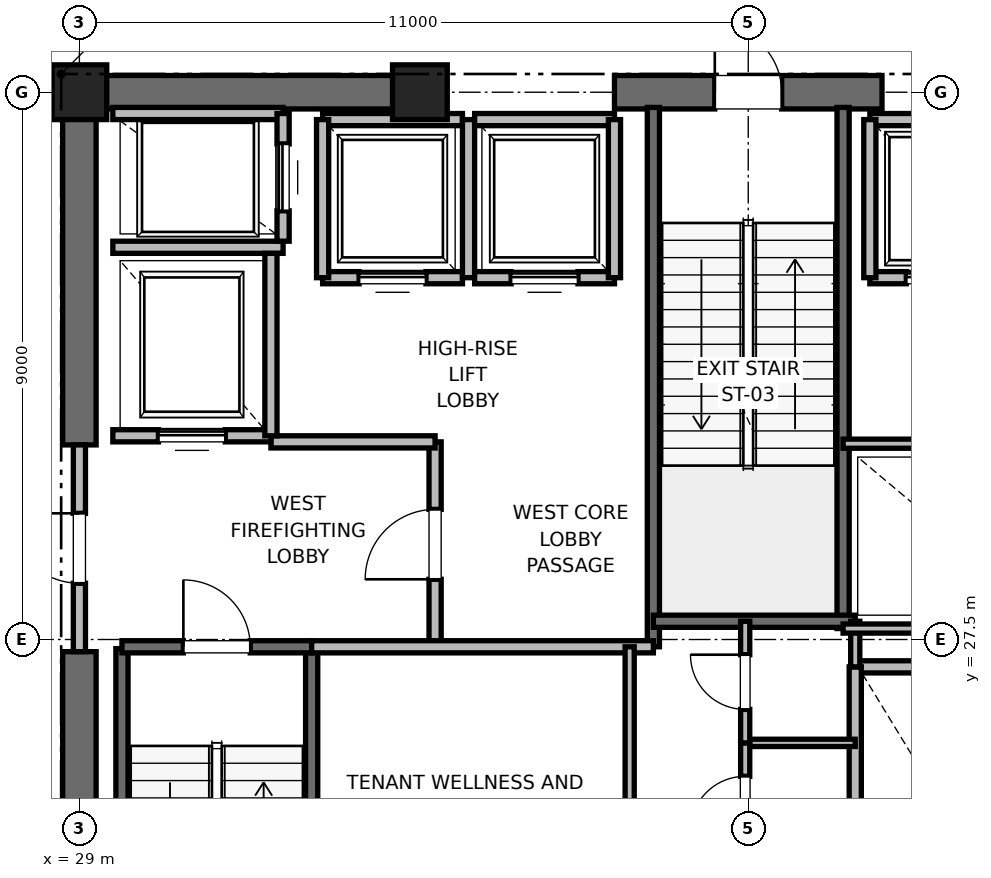
"""IFC4 building model, lengths in metres.
Left out: names, types, materials, properties, quantities, classifications, styles, units other than length and angle.
Written with IfcOpenShell. Run it as: python <this file> out.ifc"""

import sys

from ifc_helpers import new_model, si_unit, direction, frame, frame_2d, origin, origin_2d, place, context, subcontext, project, spatial, rectangle, extrude, element, fill, save


model = new_model("IFC4")
c1 = context("Model", 3, precision=1e-05, world=origin(), true_north=direction((0.0, 1.0)))
c2 = subcontext(c1, "Body", "Model", "MODEL_VIEW")
j1 = project(units=[si_unit("LENGTHUNIT", "METRE"), si_unit("PLANEANGLEUNIT", "RADIAN")], contexts=[c1])
p1 = place(None, origin())
s1 = spatial("IfcSite", under=j1, at=p1, CompositionType="ELEMENT")
p2 = place(p1, origin())
s2 = spatial("IfcBuilding", under=s1, at=p2, CompositionType="ELEMENT")
p3 = place(p2, frame((0.0, 0.0, 238.2)))
s3 = spatial("IfcBuildingStorey", under=s2, at=p3, CompositionType="ELEMENT", Elevation=238.2)
for number, where, z_axis, x_axis in (
    (1, (29.0, 36.5, 0.0), (0.0, 0.0, 1.0), (1.0, 0.0, 0.0)),
    (2, (34.6, 36.5, 0.0), (0.0, 0.0, 1.0), (1.0, 0.0, 0.0)),
):
    element("IfcColumn", number, at=place(p3, frame(where, z_axis=z_axis, x_axis=x_axis)), inside=s3, PredefinedType="PILASTER", context=c2, shape_type="SweptSolid", body=[
        extrude(rectangle(XDim=0.9, YDim=0.9, at=origin_2d()), origin(), (0.0, 0.0, 1.0), 5.0),
    ])
p4 = place(p3, frame((29.0, 36.5, 0.0), z_axis=(0.0, 0.0, 1.0), x_axis=(1.0, 0.0, 0.0)))
e3 = element("IfcWall", 3, at=p4, inside=s3, PredefinedType="SHEAR", context=c2, shape_type="SweptSolid", body=[
    extrude(rectangle(XDim=5.8, YDim=0.55, at=frame_2d((2.9, 0.0))), origin(), (0.0, 0.0, 1.0), 4.785),
])
p5 = place(p3, frame((37.8, 36.5, 0.0), z_axis=(0.0, 0.0, 1.0), x_axis=(1.0, 0.0, 0.0)))
e4 = element("IfcWall", 4, at=p5, inside=s3, PredefinedType="SHEAR", context=c2, shape_type="SweptSolid", body=[
    extrude(rectangle(XDim=4.4, YDim=0.55, at=frame_2d((2.2, 0.0))), origin(), (0.0, 0.0, 1.0), 4.785),
])
p6 = place(p5, frame((1.65, 0.0, 0.0)))
e5 = element("IfcOpeningElement", 5, at=p6, cuts=e4, PredefinedType="OPENING", context=c2, shape_type="SweptSolid", body=[
    extrude(rectangle(XDim=1.1, YDim=2.15, at=frame_2d((0.55, 1.075))), frame((0.0, 0.275, 0.0), z_axis=(0.0, -1.0, 0.0), x_axis=(1.0, 0.0, 0.0)), (0.0, 0.0, 1.0), 0.55),
])
p7 = place(p3, frame((29.0, 18.5, 0.0), z_axis=(0.0, 0.0, 1.0), x_axis=(0.0, 1.0, 0.0)))
e6 = element("IfcWall", 6, at=p7, inside=s3, PredefinedType="SHEAR", context=c2, shape_type="SweptSolid", body=[
    extrude(rectangle(XDim=8.8, YDim=0.55, at=frame_2d((4.4, 0.0))), origin(), (0.0, 0.0, 1.0), 4.785),
])
p8 = place(p3, frame((29.0, 30.7, 0.0), z_axis=(0.0, 0.0, 1.0), x_axis=(0.0, 1.0, 0.0)))
e7 = element("IfcWall", 7, at=p8, inside=s3, PredefinedType="SHEAR", context=c2, shape_type="SweptSolid", body=[
    extrude(rectangle(XDim=5.8, YDim=0.55, at=frame_2d((2.9, 0.0))), origin(), (0.0, 0.0, 1.0), 4.785),
])
p9 = place(p3, frame((29.7, 19.2, 0.0), z_axis=(0.0, 0.0, 1.0), x_axis=(0.0, 1.0, 0.0)))
e8 = element("IfcWall", 8, at=p9, inside=s3, PredefinedType="SOLIDWALL", context=c2, shape_type="SweptSolid", body=[
    extrude(rectangle(XDim=8.15, YDim=0.2, at=frame_2d((4.075, 0.0))), origin(), (0.0, 0.0, 1.0), 4.785),
])
p10 = place(p3, frame((32.82, 18.6, 0.0), z_axis=(0.0, 0.0, 1.0), x_axis=(0.0, 1.0, 0.0)))
e9 = element("IfcWall", 9, at=p10, inside=s3, PredefinedType="SOLIDWALL", context=c2, shape_type="SweptSolid", body=[
    extrude(rectangle(XDim=8.78, YDim=0.2, at=frame_2d((4.39, 0.0))), origin(), (0.0, 0.0, 1.0), 4.785),
])
p11 = place(p3, frame((29.7, 27.38, 0.0), z_axis=(0.0, 0.0, 1.0), x_axis=(1.0, 0.0, 0.0)))
e10 = element("IfcWall", 10, at=p11, inside=s3, PredefinedType="SOLIDWALL", context=c2, shape_type="SweptSolid", body=[
    extrude(rectangle(XDim=3.12, YDim=0.2, at=frame_2d((1.56, 0.0))), origin(), (0.0, 0.0, 1.0), 4.785),
])
p12 = place(p11, frame((1.01, 0.0, 0.0)))
e11 = element("IfcOpeningElement", 11, at=p12, cuts=e10, PredefinedType="OPENING", context=c2, shape_type="SweptSolid", body=[
    extrude(rectangle(XDim=1.1, YDim=2.15, at=frame_2d((0.55, 1.075))), frame((0.0, 0.1, 0.0), z_axis=(0.0, -1.0, 0.0), x_axis=(1.0, 0.0, 0.0)), (0.0, 0.0, 1.0), 0.2),
])
p13 = place(p3, frame((38.44, 27.38, 0.0), z_axis=(0.0, 0.0, 1.0), x_axis=(0.0, 1.0, 0.0)))
e12 = element("IfcWall", 12, at=p13, inside=s3, PredefinedType="SOLIDWALL", context=c2, shape_type="SweptSolid", body=[
    extrude(rectangle(XDim=8.87, YDim=0.2, at=frame_2d((4.435, 0.0))), origin(), (0.0, 0.0, 1.0), 4.785),
])
p14 = place(p3, frame((41.56, 27.68, 0.0), z_axis=(0.0, 0.0, 1.0), x_axis=(0.0, 1.0, 0.0)))
e13 = element("IfcWall", 13, at=p14, inside=s3, PredefinedType="SOLIDWALL", context=c2, shape_type="SweptSolid", body=[
    extrude(rectangle(XDim=8.57, YDim=0.2, at=frame_2d((4.285, 0.0))), origin(), (0.0, 0.0, 1.0), 4.785),
])
p15 = place(p3, frame((38.44, 27.8, 0.0), z_axis=(0.0, 0.0, 1.0), x_axis=(1.0, 0.0, 0.0)))
e14 = element("IfcWall", 14, at=p15, inside=s3, PredefinedType="SOLIDWALL", context=c2, shape_type="SweptSolid", body=[
    extrude(rectangle(XDim=3.32, YDim=0.2, at=frame_2d((1.66, 0.0))), origin(), (0.0, 0.0, 1.0), 4.785),
])
p16 = place(p3, frame((34.85, 27.38, 0.0), z_axis=(0.0, 0.0, 1.0), x_axis=(0.0, 1.0, 0.0)))
e15 = element("IfcWall", 15, at=p16, inside=s3, PredefinedType="PARTITIONING", context=c2, shape_type="SweptSolid", body=[
    extrude(rectangle(XDim=3.37, YDim=0.2, at=frame_2d((1.685, 0.0))), origin(), (0.0, 0.0, 1.0), 4.785),
])
p17 = place(p16, frame((1.11, 0.0, 0.0)))
e16 = element("IfcOpeningElement", 16, at=p17, cuts=e15, PredefinedType="OPENING", context=c2, shape_type="SweptSolid", body=[
    extrude(rectangle(XDim=1.15, YDim=2.2, at=frame_2d((0.575, 1.1))), frame((0.0, 0.1, 0.0), z_axis=(0.0, -1.0, 0.0), x_axis=(1.0, 0.0, 0.0)), (0.0, 0.0, 1.0), 0.2),
])
p18 = place(p3, frame((29.0, 27.3, 0.0), z_axis=(0.0, 0.0, 1.0), x_axis=(0.0, 1.0, 0.0)))
e17 = element("IfcWall", 17, at=p18, inside=s3, PredefinedType="PARTITIONING", context=c2, shape_type="SweptSolid", body=[
    extrude(rectangle(XDim=3.4, YDim=0.2, at=frame_2d((1.7, 0.0))), origin(), (0.0, 0.0, 1.0), 3.765),
])
p19 = place(p18, frame((1.125, 0.0, 0.0)))
e18 = element("IfcOpeningElement", 18, at=p19, cuts=e17, PredefinedType="OPENING", context=c2, shape_type="SweptSolid", body=[
    extrude(rectangle(XDim=1.15, YDim=2.2, at=frame_2d((0.575, 1.1))), frame((0.0, 0.1, 0.0), z_axis=(0.0, -1.0, 0.0), x_axis=(1.0, 0.0, 0.0)), (0.0, 0.0, 1.0), 0.2),
])
p20 = place(p3, frame((32.82, 27.38, 0.0), z_axis=(0.0, 0.0, 1.0), x_axis=(1.0, 0.0, 0.0)))
e19 = element("IfcWall", 19, at=p20, inside=s3, PredefinedType="PARTITIONING", context=c2, shape_type="SweptSolid", body=[
    extrude(rectangle(XDim=5.62, YDim=0.2, at=frame_2d((2.81, 0.0))), origin(), (0.0, 0.0, 1.0), 4.785),
])
p21 = place(p3, frame((32.15, 30.75, 0.0), z_axis=(0.0, 0.0, 1.0), x_axis=(1.0, 0.0, 0.0)))
e20 = element("IfcWall", 20, at=p21, inside=s3, PredefinedType="PARTITIONING", context=c2, shape_type="SweptSolid", body=[
    extrude(rectangle(XDim=2.7, YDim=0.2, at=frame_2d((1.35, 0.0))), origin(), (0.0, 0.0, 1.0), 4.785),
])
p22 = place(p3, frame((29.55, 30.85, 0.0), z_axis=(0.0, 0.0, 1.0), x_axis=(1.0, 0.0, 0.0)))
e21 = element("IfcWall", 21, at=p22, inside=s3, PredefinedType="SOLIDWALL", context=c2, shape_type="SweptSolid", body=[
    extrude(rectangle(XDim=2.6, YDim=0.2, at=frame_2d((1.3, 0.0))), origin(), (0.0, 0.0, 1.0), 3.765),
])
p23 = place(p22, frame((0.75, 0.0, 0.0)))
e22 = element("IfcOpeningElement", 22, at=p23, cuts=e21, PredefinedType="OPENING", context=c2, shape_type="SweptSolid", body=[
    extrude(rectangle(XDim=1.1, YDim=2.2, at=frame_2d((0.55, 1.1))), frame((0.0, 0.1, 0.0), z_axis=(0.0, -1.0, 0.0), x_axis=(1.0, 0.0, 0.0)), (0.0, 0.0, 1.0), 0.2),
])
p24 = place(p3, frame((29.55, 33.95, 0.0), z_axis=(0.0, 0.0, 1.0), x_axis=(1.0, 0.0, 0.0)))
e23 = element("IfcWall", 23, at=p24, inside=s3, PredefinedType="SOLIDWALL", context=c2, shape_type="SweptSolid", body=[
    extrude(rectangle(XDim=2.8, YDim=0.2, at=frame_2d((1.4, 0.0))), origin(), (0.0, 0.0, 1.0), 4.785),
])
p25 = place(p3, frame((32.15, 30.85, 0.0), z_axis=(0.0, 0.0, 1.0), x_axis=(0.0, 1.0, 0.0)))
e24 = element("IfcWall", 24, at=p25, inside=s3, PredefinedType="SOLIDWALL", context=c2, shape_type="SweptSolid", body=[
    extrude(rectangle(XDim=3.0, YDim=0.2, at=frame_2d((1.5, 0.0))), origin(), (0.0, 0.0, 1.0), 4.785),
])
p26 = place(p3, frame((32.35, 36.15, 0.0), z_axis=(0.0, 0.0, 1.0), x_axis=(-1.0, 0.0, 0.0)))
e25 = element("IfcWall", 25, at=p26, inside=s3, PredefinedType="SOLIDWALL", context=c2, shape_type="SweptSolid", body=[
    extrude(rectangle(XDim=2.8, YDim=0.2, at=frame_2d((1.4, 0.0))), origin(), (0.0, 0.0, 1.0), 4.072),
])
p27 = place(p3, frame((32.35, 34.05, 0.0), z_axis=(0.0, 0.0, 1.0), x_axis=(0.0, 1.0, 0.0)))
e26 = element("IfcWall", 26, at=p27, inside=s3, PredefinedType="SOLIDWALL", context=c2, shape_type="SweptSolid", body=[
    extrude(rectangle(XDim=2.1, YDim=0.2, at=frame_2d((1.05, 0.0))), origin(), (0.0, 0.0, 1.0), 4.785),
])
p28 = place(p27, frame((0.5, 0.0, 0.0)))
e27 = element("IfcOpeningElement", 27, at=p28, cuts=e26, PredefinedType="OPENING", context=c2, shape_type="SweptSolid", body=[
    extrude(rectangle(XDim=1.1, YDim=2.2, at=frame_2d((0.55, 1.1))), frame((0.0, 0.1, 0.0), z_axis=(0.0, -1.0, 0.0), x_axis=(1.0, 0.0, 0.0)), (0.0, 0.0, 1.0), 0.2),
])
p29 = place(p3, frame((43.44, 27.05, 0.0), z_axis=(0.0, 0.0, 1.0), x_axis=(-1.0, 0.0, 0.0)))
e28 = element("IfcWall", 28, at=p29, inside=s3, PredefinedType="SOLIDWALL", context=c2, shape_type="SweptSolid", body=[
    extrude(rectangle(XDim=1.68, YDim=0.2, at=frame_2d((0.84, 0.0))), origin(), (0.0, 0.0, 1.0), 4.785),
])
p30 = place(p3, frame((41.76, 27.05, 0.0), z_axis=(0.0, 0.0, 1.0), x_axis=(0.0, -1.0, 0.0)))
e29 = element("IfcWall", 29, at=p30, inside=s3, PredefinedType="SOLIDWALL", context=c2, shape_type="SweptSolid", body=[
    extrude(rectangle(XDim=2.6, YDim=0.2, at=frame_2d((1.3, 0.0))), origin(), (0.0, 0.0, 1.0), 4.785),
])
p31 = place(p3, frame((33.0, 33.45, 0.0), z_axis=(0.0, 0.0, 1.0), x_axis=(1.0, 0.0, 0.0)))
e30 = element("IfcWall", 30, at=p31, inside=s3, PredefinedType="SOLIDWALL", context=c2, shape_type="SweptSolid", body=[
    extrude(rectangle(XDim=2.3, YDim=0.2, at=frame_2d((1.15, 0.0))), origin(), (0.0, 0.0, 1.0), 4.785),
])
p32 = place(p31, frame((0.6, 0.0, 0.0)))
e31 = element("IfcOpeningElement", 31, at=p32, cuts=e30, PredefinedType="OPENING", context=c2, shape_type="SweptSolid", body=[
    extrude(rectangle(XDim=1.1, YDim=2.2, at=frame_2d((0.55, 1.1))), frame((0.0, 0.1, 0.0), z_axis=(0.0, -1.0, 0.0), x_axis=(1.0, 0.0, 0.0)), (0.0, 0.0, 1.0), 0.2),
])
p33 = place(p3, frame((35.3, 36.05, 0.0), z_axis=(0.0, 0.0, 1.0), x_axis=(-1.0, 0.0, 0.0)))
e32 = element("IfcWall", 32, at=p33, inside=s3, PredefinedType="SOLIDWALL", context=c2, shape_type="SweptSolid", body=[
    extrude(rectangle(XDim=2.3, YDim=0.2, at=frame_2d((1.15, 0.0))), origin(), (0.0, 0.0, 1.0), 3.765),
])
p34 = place(p3, frame((33.0, 36.05, 0.0), z_axis=(0.0, 0.0, 1.0), x_axis=(0.0, -1.0, 0.0)))
e33 = element("IfcWall", 33, at=p34, inside=s3, PredefinedType="SOLIDWALL", context=c2, shape_type="SweptSolid", body=[
    extrude(rectangle(XDim=2.6, YDim=0.2, at=frame_2d((1.3, 0.0))), origin(), (0.0, 0.0, 1.0), 4.785),
])
p35 = place(p3, frame((35.4, 33.45, 0.0), z_axis=(0.0, 0.0, 1.0), x_axis=(0.0, 1.0, 0.0)))
e34 = element("IfcWall", 34, at=p35, inside=s3, PredefinedType="SOLIDWALL", context=c2, shape_type="SweptSolid", body=[
    extrude(rectangle(XDim=2.6, YDim=0.2, at=frame_2d((1.3, 0.0))), origin(), (0.0, 0.0, 1.0), 3.765),
])
p36 = place(p3, frame((35.5, 33.45, 0.0), z_axis=(0.0, 0.0, 1.0), x_axis=(1.0, 0.0, 0.0)))
e35 = element("IfcWall", 35, at=p36, inside=s3, PredefinedType="SOLIDWALL", context=c2, shape_type="SweptSolid", body=[
    extrude(rectangle(XDim=2.3, YDim=0.2, at=frame_2d((1.15, 0.0))), origin(), (0.0, 0.0, 1.0), 4.785),
])
p37 = place(p36, frame((0.6, 0.0, 0.0)))
e36 = element("IfcOpeningElement", 36, at=p37, cuts=e35, PredefinedType="OPENING", context=c2, shape_type="SweptSolid", body=[
    extrude(rectangle(XDim=1.1, YDim=2.2, at=frame_2d((0.55, 1.1))), frame((0.0, 0.1, 0.0), z_axis=(0.0, -1.0, 0.0), x_axis=(1.0, 0.0, 0.0)), (0.0, 0.0, 1.0), 0.2),
])
p38 = place(p3, frame((37.8, 36.05, 0.0), z_axis=(0.0, 0.0, 1.0), x_axis=(-1.0, 0.0, 0.0)))
e37 = element("IfcWall", 37, at=p38, inside=s3, PredefinedType="SOLIDWALL", context=c2, shape_type="SweptSolid", body=[
    extrude(rectangle(XDim=2.3, YDim=0.2, at=frame_2d((1.15, 0.0))), origin(), (0.0, 0.0, 1.0), 3.765),
])
p39 = place(p3, frame((37.8, 33.45, 0.0), z_axis=(0.0, 0.0, 1.0), x_axis=(0.0, 1.0, 0.0)))
e38 = element("IfcWall", 38, at=p39, inside=s3, PredefinedType="SOLIDWALL", context=c2, shape_type="SweptSolid", body=[
    extrude(rectangle(XDim=2.6, YDim=0.2, at=frame_2d((1.3, 0.0))), origin(), (0.0, 0.0, 1.0), 3.765),
])
p40 = place(p3, frame((42.0, 33.45, 0.0), z_axis=(0.0, 0.0, 1.0), x_axis=(1.0, 0.0, 0.0)))
e39 = element("IfcWall", 39, at=p40, inside=s3, PredefinedType="SOLIDWALL", context=c2, shape_type="SweptSolid", body=[
    extrude(rectangle(XDim=2.3, YDim=0.2, at=frame_2d((1.15, 0.0))), origin(), (0.0, 0.0, 1.0), 4.785),
])
p41 = place(p40, frame((0.6, 0.0, 0.0)))
e40 = element("IfcOpeningElement", 40, at=p41, cuts=e39, PredefinedType="OPENING", context=c2, shape_type="SweptSolid", body=[
    extrude(rectangle(XDim=1.1, YDim=2.2, at=frame_2d((0.55, 1.1))), frame((0.0, 0.1, 0.0), z_axis=(0.0, -1.0, 0.0), x_axis=(1.0, 0.0, 0.0)), (0.0, 0.0, 1.0), 0.2),
])
p42 = place(p3, frame((44.3, 36.05, 0.0), z_axis=(0.0, 0.0, 1.0), x_axis=(-1.0, 0.0, 0.0)))
e41 = element("IfcWall", 41, at=p42, inside=s3, PredefinedType="SOLIDWALL", context=c2, shape_type="SweptSolid", body=[
    extrude(rectangle(XDim=2.3, YDim=0.2, at=frame_2d((1.15, 0.0))), origin(), (0.0, 0.0, 1.0), 3.765),
])
p43 = place(p3, frame((42.0, 36.05, 0.0), z_axis=(0.0, 0.0, 1.0), x_axis=(0.0, -1.0, 0.0)))
e42 = element("IfcWall", 42, at=p43, inside=s3, PredefinedType="SOLIDWALL", context=c2, shape_type="SweptSolid", body=[
    extrude(rectangle(XDim=2.6, YDim=0.2, at=frame_2d((1.3, 0.0))), origin(), (0.0, 0.0, 1.0), 3.765),
])
p44 = place(p3, frame((39.95, 25.8, 0.0), z_axis=(0.0, 0.0, 1.0), x_axis=(1.0, 0.0, 0.0)))
e43 = element("IfcWall", 43, at=p44, inside=s3, PredefinedType="PARTITIONING", context=c2, shape_type="SweptSolid", body=[
    extrude(rectangle(XDim=1.81, YDim=0.12, at=frame_2d((0.905, 0.0))), origin(), (0.0, 0.0, 1.0), 2.85),
])
p45 = place(p3, frame((41.76, 27.05, 0.0), z_axis=(0.0, 0.0, 1.0), x_axis=(0.0, 1.0, 0.0)))
e44 = element("IfcWall", 44, at=p45, inside=s3, PredefinedType="PARTITIONING", context=c2, shape_type="SweptSolid", body=[
    extrude(rectangle(XDim=0.75, YDim=0.15, at=frame_2d((0.375, 0.0))), origin(), (0.0, 0.0, 1.0), 2.85),
])
p46 = place(p3, frame((39.95, 23.8, 0.0), z_axis=(0.0, 0.0, 1.0), x_axis=(0.0, 1.0, 0.0)))
e45 = element("IfcWall", 45, at=p46, inside=s3, PredefinedType="PARTITIONING", context=c2, shape_type="SweptSolid", body=[
    extrude(rectangle(XDim=2.0, YDim=0.15, at=frame_2d((1.0, 0.0))), origin(), (0.0, 0.0, 1.0), 2.85),
])
p47 = place(p46, frame((0.55, 0.0, 0.0)))
e46 = element("IfcOpeningElement", 46, at=p47, cuts=e45, PredefinedType="OPENING", context=c2, shape_type="SweptSolid", body=[
    extrude(rectangle(XDim=0.9, YDim=2.1, at=frame_2d((0.45, 1.05))), frame((0.0, 0.075, 0.0), z_axis=(0.0, -1.0, 0.0), x_axis=(1.0, 0.0, 0.0)), (0.0, 0.0, 1.0), 0.15),
])
p48 = place(p3, frame((39.95, 25.8, 0.0), z_axis=(0.0, 0.0, 1.0), x_axis=(0.0, 1.0, 0.0)))
e47 = element("IfcWall", 47, at=p48, inside=s3, PredefinedType="PARTITIONING", context=c2, shape_type="SweptSolid", body=[
    extrude(rectangle(XDim=2.0, YDim=0.15, at=frame_2d((1.0, 0.0))), origin(), (0.0, 0.0, 1.0), 2.85),
])
p49 = place(p48, frame((0.55, 0.0, 0.0)))
e48 = element("IfcOpeningElement", 48, at=p49, cuts=e47, PredefinedType="OPENING", context=c2, shape_type="SweptSolid", body=[
    extrude(rectangle(XDim=0.9, YDim=2.1, at=frame_2d((0.45, 1.05))), frame((0.0, 0.075, 0.0), z_axis=(0.0, -1.0, 0.0), x_axis=(1.0, 0.0, 0.0)), (0.0, 0.0, 1.0), 0.15),
])
p50 = place(p3, frame((38.05, 18.6, 0.0), z_axis=(0.0, 0.0, 1.0), x_axis=(0.0, 1.0, 0.0)))
e49 = element("IfcWall", 49, at=p50, inside=s3, PredefinedType="PARTITIONING", context=c2, shape_type="SweptSolid", body=[
    extrude(rectangle(XDim=8.78, YDim=0.15, at=frame_2d((4.39, 0.0))), origin(), (0.0, 0.0, 1.0), 2.85),
])
p51 = place(p50, frame((3.89, 0.0, 0.0)))
e50 = element("IfcOpeningElement", 50, at=p51, cuts=e49, PredefinedType="OPENING", context=c2, shape_type="SweptSolid", body=[
    extrude(rectangle(XDim=1.0, YDim=2.15, at=frame_2d((0.5, 1.075))), frame((0.0, 0.075, 0.0), z_axis=(0.0, -1.0, 0.0), x_axis=(1.0, 0.0, 0.0)), (0.0, 0.0, 1.0), 0.15),
])
p52 = place(p3, frame((41.56, 27.68, 0.0), z_axis=(0.0, 0.0, 1.0), x_axis=(1.0, 0.0, 0.0)))
e51 = element("IfcWall", 51, at=p52, inside=s3, PredefinedType="PARTITIONING", context=c2, shape_type="SweptSolid", body=[
    extrude(rectangle(XDim=3.59, YDim=0.15, at=frame_2d((1.795, 0.0))), origin(), (0.0, 0.0, 1.0), 2.85),
])
p53 = place(p3, frame((41.56, 30.72, 0.0), z_axis=(0.0, 0.0, 1.0), x_axis=(1.0, 0.0, 0.0)))
e52 = element("IfcWall", 52, at=p53, inside=s3, PredefinedType="PARTITIONING", context=c2, shape_type="SweptSolid", body=[
    extrude(rectangle(XDim=3.59, YDim=0.15, at=frame_2d((1.795, 0.0))), origin(), (0.0, 0.0, 1.0), 2.85),
])
p54 = place(p53, frame((1.355, 0.0, 0.0)))
e53 = element("IfcOpeningElement", 53, at=p54, cuts=e52, PredefinedType="OPENING", context=c2, shape_type="SweptSolid", body=[
    extrude(rectangle(XDim=0.88, YDim=2.1, at=frame_2d((0.44, 1.05))), frame((0.0, 0.075, 0.0), z_axis=(0.0, -1.0, 0.0), x_axis=(1.0, 0.0, 0.0)), (0.0, 0.0, 1.0), 0.15),
])
p55 = place(p12, origin())
e54 = element("IfcDoor", 54, at=p55, inside=s3, OperationType="SINGLE_SWING_LEFT", PredefinedType="DOOR", context=c2, shape_type="SweptSolid", body=[
    extrude(rectangle(XDim=1.1, YDim=2.15, at=frame_2d((0.55, 1.075))), frame((0.0, 0.025, 0.0), z_axis=(0.0, -1.0, 0.0), x_axis=(1.0, 0.0, 0.0)), (0.0, 0.0, 1.0), 0.05),
])
fill(e11, e54)
p56 = place(p6, origin())
e55 = element("IfcDoor", 55, at=p56, inside=s3, OperationType="SINGLE_SWING_LEFT", PredefinedType="DOOR", context=c2, shape_type="SweptSolid", body=[
    extrude(rectangle(XDim=1.1, YDim=2.15, at=frame_2d((0.55, 1.075))), frame((0.0, 0.025, 0.0), z_axis=(0.0, -1.0, 0.0), x_axis=(1.0, 0.0, 0.0)), (0.0, 0.0, 1.0), 0.05),
])
fill(e5, e55)
p57 = place(p17, origin())
e56 = element("IfcDoor", 56, at=p57, inside=s3, OperationType="SINGLE_SWING_LEFT", PredefinedType="DOOR", context=c2, shape_type="SweptSolid", body=[
    extrude(rectangle(XDim=1.15, YDim=2.2, at=frame_2d((0.575, 1.1))), frame((0.0, 0.025, 0.0), z_axis=(0.0, -1.0, 0.0), x_axis=(1.0, 0.0, 0.0)), (0.0, 0.0, 1.0), 0.05),
])
fill(e16, e56)
p58 = place(p19, origin())
e57 = element("IfcDoor", 57, at=p58, inside=s3, OperationType="SINGLE_SWING_RIGHT", PredefinedType="DOOR", context=c2, shape_type="SweptSolid", body=[
    extrude(rectangle(XDim=1.15, YDim=2.2, at=frame_2d((0.575, 1.1))), frame((0.0, 0.025, 0.0), z_axis=(0.0, -1.0, 0.0), x_axis=(1.0, 0.0, 0.0)), (0.0, 0.0, 1.0), 0.05),
])
fill(e18, e57)
p59 = place(p23, origin())
e58 = element("IfcDoor", 58, at=p59, inside=s3, OperationType="SLIDING_TO_RIGHT", PredefinedType="DOOR", context=c2, shape_type="SweptSolid", body=[
    extrude(rectangle(XDim=1.1, YDim=2.2, at=frame_2d((0.55, 1.1))), frame((0.0, 0.025, 0.0), z_axis=(0.0, -1.0, 0.0), x_axis=(1.0, 0.0, 0.0)), (0.0, 0.0, 1.0), 0.05),
])
fill(e22, e58)
p60 = place(p28, origin())
e59 = element("IfcDoor", 59, at=p60, inside=s3, OperationType="SLIDING_TO_RIGHT", PredefinedType="DOOR", context=c2, shape_type="SweptSolid", body=[
    extrude(rectangle(XDim=1.1, YDim=2.2, at=frame_2d((0.55, 1.1))), frame((0.0, 0.025, 0.0), z_axis=(0.0, -1.0, 0.0), x_axis=(1.0, 0.0, 0.0)), (0.0, 0.0, 1.0), 0.05),
])
fill(e27, e59)
p61 = place(p32, origin())
e60 = element("IfcDoor", 60, at=p61, inside=s3, OperationType="SLIDING_TO_RIGHT", PredefinedType="DOOR", context=c2, shape_type="SweptSolid", body=[
    extrude(rectangle(XDim=1.1, YDim=2.2, at=frame_2d((0.55, 1.1))), frame((0.0, 0.025, 0.0), z_axis=(0.0, -1.0, 0.0), x_axis=(1.0, 0.0, 0.0)), (0.0, 0.0, 1.0), 0.05),
])
fill(e31, e60)
p62 = place(p37, origin())
e61 = element("IfcDoor", 61, at=p62, inside=s3, OperationType="SLIDING_TO_RIGHT", PredefinedType="DOOR", context=c2, shape_type="SweptSolid", body=[
    extrude(rectangle(XDim=1.1, YDim=2.2, at=frame_2d((0.55, 1.1))), frame((0.0, 0.025, 0.0), z_axis=(0.0, -1.0, 0.0), x_axis=(1.0, 0.0, 0.0)), (0.0, 0.0, 1.0), 0.05),
])
fill(e36, e61)
p63 = place(p41, origin())
e62 = element("IfcDoor", 62, at=p63, inside=s3, OperationType="SLIDING_TO_RIGHT", PredefinedType="DOOR", context=c2, shape_type="SweptSolid", body=[
    extrude(rectangle(XDim=1.1, YDim=2.2, at=frame_2d((0.55, 1.1))), frame((0.0, 0.025, 0.0), z_axis=(0.0, -1.0, 0.0), x_axis=(1.0, 0.0, 0.0)), (0.0, 0.0, 1.0), 0.05),
])
fill(e40, e62)
p64 = place(p47, origin())
e63 = element("IfcDoor", 63, at=p64, inside=s3, OperationType="SINGLE_SWING_LEFT", PredefinedType="DOOR", context=c2, shape_type="SweptSolid", body=[
    extrude(rectangle(XDim=0.9, YDim=2.1, at=frame_2d((0.45, 1.05))), frame((0.0, 0.025, 0.0), z_axis=(0.0, -1.0, 0.0), x_axis=(1.0, 0.0, 0.0)), (0.0, 0.0, 1.0), 0.05),
])
fill(e46, e63)
p65 = place(p49, origin())
e64 = element("IfcDoor", 64, at=p65, inside=s3, OperationType="SINGLE_SWING_RIGHT", PredefinedType="DOOR", context=c2, shape_type="SweptSolid", body=[
    extrude(rectangle(XDim=0.9, YDim=2.1, at=frame_2d((0.45, 1.05))), frame((0.0, 0.025, 0.0), z_axis=(0.0, -1.0, 0.0), x_axis=(1.0, 0.0, 0.0)), (0.0, 0.0, 1.0), 0.05),
])
fill(e48, e64)
save(model, sys.argv[1])
